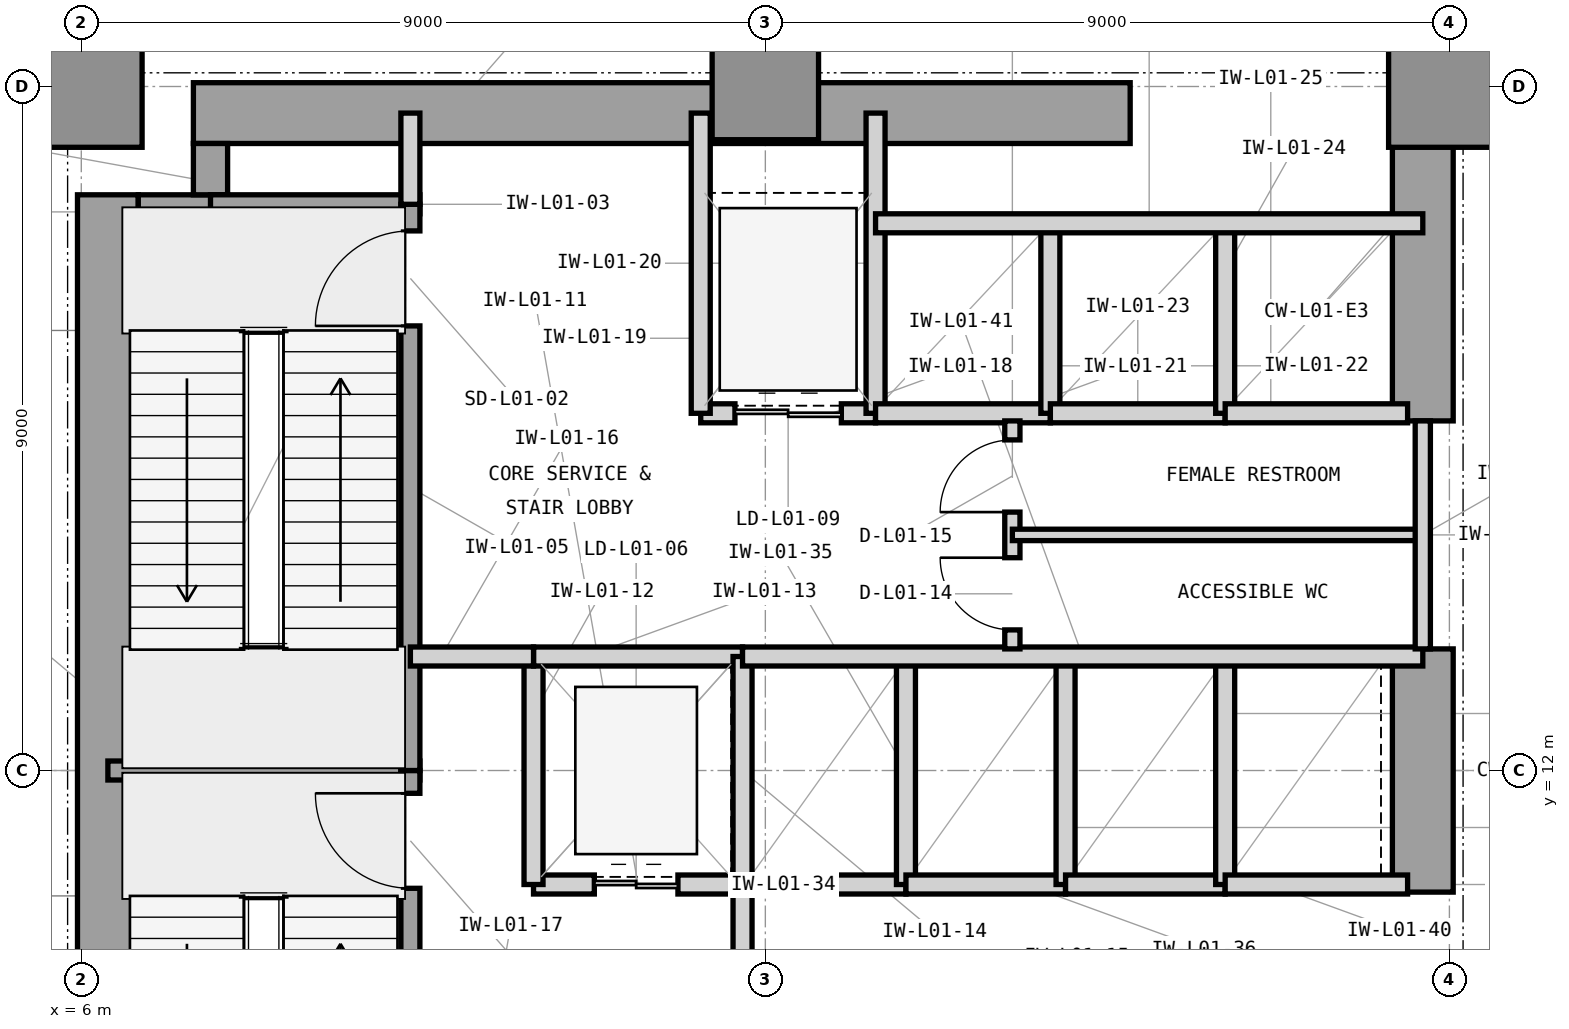
"""IFC4 building model, lengths in metres.
Left out: names, types, materials, properties, quantities, classifications, styles, units other than length and angle.
Written with IfcOpenShell. Run it as: python <this file> out.ifc"""

import sys

from ifc_helpers import new_model, si_unit, direction, frame, frame_2d, origin, origin_2d, place, context, subcontext, project, spatial, rectangle, extrude, element, fill, save


model = new_model("IFC4")
c1 = context("Model", 3, precision=1e-05, world=origin(), true_north=direction((0.0, 1.0)))
c2 = subcontext(c1, "Body", "Model", "MODEL_VIEW")
j1 = project(units=[si_unit("LENGTHUNIT", "METRE"), si_unit("PLANEANGLEUNIT", "RADIAN")], contexts=[c1])
p1 = place(None, origin())
s1 = spatial("IfcSite", under=j1, at=p1, CompositionType="ELEMENT")
p2 = place(p1, origin())
s2 = spatial("IfcBuilding", under=s1, at=p2, CompositionType="ELEMENT")
p3 = place(p2, frame((0.0, 0.0, 5.4)))
s3 = spatial("IfcBuildingStorey", under=s2, at=p3, CompositionType="ELEMENT", Elevation=5.4)
p4 = place(p3, frame((6.35, 4.425, 0.0), z_axis=(0.0, 0.0, 1.0), x_axis=(0.0, 1.0, 0.0)))
e1 = element("IfcWall", 1, at=p4, inside=s3, PredefinedType="SHEAR", context=c2, shape_type="SweptSolid", body=[
    extrude(rectangle(XDim=15.15, YDim=0.8, at=frame_2d((7.575, 0.0))), origin(), (0.0, 0.0, 1.0), 5.4),
])
p5 = place(p3, frame((7.475, 20.65, 0.0), z_axis=(0.0, 0.0, 1.0), x_axis=(1.0, 0.0, 0.0)))
e2 = element("IfcWall", 2, at=p5, inside=s3, PredefinedType="SHEAR", context=c2, shape_type="SweptSolid", body=[
    extrude(rectangle(XDim=12.325, YDim=0.8, at=frame_2d((6.163, 0.0))), origin(), (0.0, 0.0, 1.0), 5.4),
])
p6 = place(p3, frame((23.65, 10.4, 0.0), z_axis=(0.0, 0.0, 1.0), x_axis=(0.0, 1.0, 0.0)))
e3 = element("IfcWall", 3, at=p6, inside=s3, PredefinedType="SHEAR", context=c2, shape_type="SweptSolid", body=[
    extrude(rectangle(XDim=3.2, YDim=0.8, at=frame_2d((1.6, 0.0))), origin(), (0.0, 0.0, 1.0), 5.4),
])
p7 = place(p3, frame((23.65, 16.6, 0.0), z_axis=(0.0, 0.0, 1.0), x_axis=(0.0, 1.0, 0.0)))
e4 = element("IfcWall", 4, at=p7, inside=s3, PredefinedType="SHEAR", context=c2, shape_type="SweptSolid", body=[
    extrude(rectangle(XDim=4.05, YDim=0.8, at=frame_2d((2.025, 0.0))), origin(), (0.0, 0.0, 1.0), 5.4),
])
p8 = place(p3, frame((6.75, 19.35, 0.0), z_axis=(0.0, 0.0, 1.0), x_axis=(1.0, 0.0, 0.0)))
e5 = element("IfcWall", 5, at=p8, inside=s3, PredefinedType="SHEAR", context=c2, shape_type="SweptSolid", body=[
    extrude(rectangle(XDim=1.175, YDim=0.45, at=frame_2d((0.587, 0.0))), origin(), (0.0, 0.0, 1.0), 5.4),
])
p9 = place(p3, frame((7.7, 19.575, 0.0), z_axis=(0.0, 0.0, 1.0), x_axis=(0.0, 1.0, 0.0)))
e6 = element("IfcWall", 6, at=p9, inside=s3, PredefinedType="SHEAR", context=c2, shape_type="SweptSolid", body=[
    extrude(rectangle(XDim=0.675, YDim=0.45, at=frame_2d((0.337, 0.0))), origin(), (0.0, 0.0, 1.0), 5.4),
])
p10 = place(p3, frame((6.0, 21.0, 0.0), z_axis=(0.0, 0.0, 1.0), x_axis=(1.0, 0.0, 0.0)))
e7 = element("IfcColumn", 7, at=p10, inside=s3, PredefinedType="COLUMN", context=c2, shape_type="SweptSolid", body=[
    extrude(rectangle(XDim=1.6, YDim=1.6, at=origin_2d()), origin(), (0.0, 0.0, 1.0), 5.4),
])
p11 = place(p3, frame((15.0, 21.0, 0.0), z_axis=(0.0, 0.0, 1.0), x_axis=(1.0, 0.0, 0.0)))
e8 = element("IfcColumn", 8, at=p11, inside=s3, PredefinedType="COLUMN", context=c2, shape_type="SweptSolid", body=[
    extrude(rectangle(XDim=1.4, YDim=1.4, at=origin_2d()), origin(), (0.0, 0.0, 1.0), 5.4),
])
p12 = place(p3, frame((24.0, 21.0, 0.0), z_axis=(0.0, 0.0, 1.0), x_axis=(1.0, 0.0, 0.0)))
e9 = element("IfcColumn", 9, at=p12, inside=s3, PredefinedType="COLUMN", context=c2, shape_type="SweptSolid", body=[
    extrude(rectangle(XDim=1.6, YDim=1.6, at=origin_2d()), origin(), (0.0, 0.0, 1.0), 5.4),
])
p13 = place(p3, frame((6.35, 12.0, 0.0), z_axis=(0.0, 0.0, 1.0), x_axis=(1.0, 0.0, 0.0)))
e10 = element("IfcWall", 10, at=p13, inside=s3, PredefinedType="SHEAR", context=c2, shape_type="SweptSolid", body=[
    extrude(rectangle(XDim=4.105, YDim=0.25, at=frame_2d((2.052, 0.0))), origin(), (0.0, 0.0, 1.0), 5.4),
])
p14 = place(p3, frame((7.7, 19.45, 0.0), z_axis=(0.0, 0.0, 1.0), x_axis=(1.0, 0.0, 0.0)))
e11 = element("IfcWall", 11, at=p14, inside=s3, PredefinedType="SHEAR", context=c2, shape_type="SweptSolid", body=[
    extrude(rectangle(XDim=2.755, YDim=0.25, at=frame_2d((1.377, 0.0))), origin(), (0.0, 0.0, 1.0), 5.4),
])
p15 = place(p3, frame((10.33, 4.55, 0.0), z_axis=(0.0, 0.0, 1.0), x_axis=(0.0, 1.0, 0.0)))
e12 = element("IfcWall", 12, at=p15, inside=s3, PredefinedType="SHEAR", context=c2, shape_type="SweptSolid", body=[
    extrude(rectangle(XDim=7.45, YDim=0.25, at=frame_2d((3.725, 0.0))), origin(), (0.0, 0.0, 1.0), 5.4),
])
p16 = place(p15, frame((5.9, 0.0, 0.0)))
e13 = element("IfcOpeningElement", 13, at=p16, cuts=e12, PredefinedType="OPENING", context=c2, shape_type="SweptSolid", body=[
    extrude(rectangle(XDim=1.25, YDim=2.2, at=frame_2d((0.625, 1.1))), frame((0.0, 0.135, 0.0), z_axis=(0.0, -1.0, 0.0), x_axis=(1.0, 0.0, 0.0)), (0.0, 0.0, 1.0), 0.27),
])
p17 = place(p3, frame((10.33, 12.0, 0.0), z_axis=(0.0, 0.0, 1.0), x_axis=(0.0, 1.0, 0.0)))
e14 = element("IfcWall", 14, at=p17, inside=s3, PredefinedType="SHEAR", context=c2, shape_type="SweptSolid", body=[
    extrude(rectangle(XDim=7.45, YDim=0.25, at=frame_2d((3.725, 0.0))), origin(), (0.0, 0.0, 1.0), 5.4),
])
p18 = place(p17, frame((5.85, 0.0, 0.0)))
e15 = element("IfcOpeningElement", 15, at=p18, cuts=e14, PredefinedType="OPENING", context=c2, shape_type="SweptSolid", body=[
    extrude(rectangle(XDim=1.25, YDim=2.2, at=frame_2d((0.625, 1.1))), frame((0.0, 0.135, 0.0), z_axis=(0.0, -1.0, 0.0), x_axis=(1.0, 0.0, 0.0)), (0.0, 0.0, 1.0), 0.27),
])
p19 = place(p3, frame((10.33, 19.45, 0.0), z_axis=(0.0, 0.0, 1.0), x_axis=(0.0, 1.0, 0.0)))
e16 = element("IfcWall", 16, at=p19, inside=s3, PredefinedType="PARTITIONING", context=c2, shape_type="SweptSolid", body=[
    extrude(rectangle(XDim=1.2, YDim=0.25, at=frame_2d((0.6, 0.0))), origin(), (0.0, 0.0, 1.0), 4.234),
])
p20 = place(p3, frame((11.95, 10.5, 0.0), z_axis=(0.0, 0.0, 1.0), x_axis=(1.0, 0.0, 0.0)))
e17 = element("IfcWall", 17, at=p20, inside=s3, PredefinedType="PARTITIONING", context=c2, shape_type="SweptSolid", body=[
    extrude(rectangle(XDim=2.75, YDim=0.25, at=frame_2d((1.375, 0.0))), origin(), (0.0, 0.0, 1.0), 4.473),
])
p21 = place(p20, frame((0.8, 0.0, 0.0)))
e18 = element("IfcOpeningElement", 18, at=p21, cuts=e17, PredefinedType="OPENING", context=c2, shape_type="SweptSolid", body=[
    extrude(rectangle(XDim=1.1, YDim=2.25, at=frame_2d((0.55, 1.125))), frame((0.0, 0.135, 0.0), z_axis=(0.0, -1.0, 0.0), x_axis=(1.0, 0.0, 0.0)), (0.0, 0.0, 1.0), 0.27),
])
p22 = place(p3, frame((11.95, 10.5, 0.0), z_axis=(0.0, 0.0, 1.0), x_axis=(0.0, 1.0, 0.0)))
e19 = element("IfcWall", 19, at=p22, inside=s3, PredefinedType="PARTITIONING", context=c2, shape_type="SweptSolid", body=[
    extrude(rectangle(XDim=3.0, YDim=0.25, at=frame_2d((1.5, 0.0))), origin(), (0.0, 0.0, 1.0), 5.09),
])
p23 = place(p3, frame((11.95, 13.5, 0.0), z_axis=(0.0, 0.0, 1.0), x_axis=(1.0, 0.0, 0.0)))
e20 = element("IfcWall", 20, at=p23, inside=s3, PredefinedType="PARTITIONING", context=c2, shape_type="SweptSolid", body=[
    extrude(rectangle(XDim=2.75, YDim=0.25, at=frame_2d((1.375, 0.0))), origin(), (0.0, 0.0, 1.0), 4.473),
])
p24 = place(p3, frame((14.7, 10.5, 0.0), z_axis=(0.0, 0.0, 1.0), x_axis=(0.0, 1.0, 0.0)))
e21 = element("IfcWall", 21, at=p24, inside=s3, PredefinedType="PARTITIONING", context=c2, shape_type="SweptSolid", body=[
    extrude(rectangle(XDim=3.0, YDim=0.25, at=frame_2d((1.5, 0.0))), origin(), (0.0, 0.0, 1.0), 5.09),
])
p25 = place(p3, frame((14.7, 6.7, 0.0), z_axis=(0.0, 0.0, 1.0), x_axis=(0.0, 1.0, 0.0)))
e22 = element("IfcWall", 22, at=p25, inside=s3, PredefinedType="PARTITIONING", context=c2, shape_type="SweptSolid", body=[
    extrude(rectangle(XDim=3.8, YDim=0.25, at=frame_2d((1.9, 0.0))), origin(), (0.0, 0.0, 1.0), 5.09),
])
p26 = place(p25, frame((1.3, 0.0, 0.0)))
e23 = element("IfcOpeningElement", 23, at=p26, cuts=e22, PredefinedType="OPENING", context=c2, shape_type="SweptSolid", body=[
    extrude(rectangle(XDim=1.2, YDim=2.2, at=frame_2d((0.6, 1.1))), frame((0.0, 0.135, 0.0), z_axis=(0.0, -1.0, 0.0), x_axis=(1.0, 0.0, 0.0)), (0.0, 0.0, 1.0), 0.27),
])
p27 = place(p3, frame((10.33, 13.5, 0.0), z_axis=(0.0, 0.0, 1.0), x_axis=(1.0, 0.0, 0.0)))
e24 = element("IfcWall", 24, at=p27, inside=s3, PredefinedType="PARTITIONING", context=c2, shape_type="SweptSolid", body=[
    extrude(rectangle(XDim=1.62, YDim=0.25, at=frame_2d((0.81, 0.0))), origin(), (0.0, 0.0, 1.0), 4.473),
])
p28 = place(p3, frame((14.15, 16.7, 0.0), z_axis=(0.0, 0.0, 1.0), x_axis=(1.0, 0.0, 0.0)))
e25 = element("IfcWall", 25, at=p28, inside=s3, PredefinedType="PARTITIONING", context=c2, shape_type="SweptSolid", body=[
    extrude(rectangle(XDim=2.3, YDim=0.25, at=frame_2d((1.15, 0.0))), origin(), (0.0, 0.0, 1.0), 4.473),
])
p29 = place(p28, frame((0.45, 0.0, 0.0)))
e26 = element("IfcOpeningElement", 26, at=p29, cuts=e25, PredefinedType="OPENING", context=c2, shape_type="SweptSolid", body=[
    extrude(rectangle(XDim=1.4, YDim=2.35, at=frame_2d((0.7, 1.175))), frame((0.0, 0.135, 0.0), z_axis=(0.0, -1.0, 0.0), x_axis=(1.0, 0.0, 0.0)), (0.0, 0.0, 1.0), 0.27),
])
for number, where, z_axis, x_axis in (
    (27, (14.15, 16.7, 0.0), (0.0, 0.0, 1.0), (0.0, 1.0, 0.0)),
    (28, (16.45, 16.7, 0.0), (0.0, 0.0, 1.0), (0.0, 1.0, 0.0)),
):
    element("IfcWall", number, at=place(p3, frame(where, z_axis=z_axis, x_axis=x_axis)), inside=s3, PredefinedType="PARTITIONING", context=c2, shape_type="SweptSolid", body=[
        extrude(rectangle(XDim=3.95, YDim=0.25, at=frame_2d((1.975, 0.0))), origin(), (0.0, 0.0, 1.0), 5.09),
    ])
p30 = place(p3, frame((16.45, 16.7, 0.0), z_axis=(0.0, 0.0, 1.0), x_axis=(1.0, 0.0, 0.0)))
e29 = element("IfcWall", 29, at=p30, inside=s3, PredefinedType="PARTITIONING", context=c2, shape_type="SweptSolid", body=[
    extrude(rectangle(XDim=2.3, YDim=0.25, at=frame_2d((1.15, 0.0))), origin(), (0.0, 0.0, 1.0), 4.473),
])
p31 = place(p3, frame((18.75, 16.7, 0.0), z_axis=(0.0, 0.0, 1.0), x_axis=(0.0, 1.0, 0.0)))
e30 = element("IfcWall", 30, at=p31, inside=s3, PredefinedType="PARTITIONING", context=c2, shape_type="SweptSolid", body=[
    extrude(rectangle(XDim=2.5, YDim=0.25, at=frame_2d((1.25, 0.0))), origin(), (0.0, 0.0, 1.0), 5.09),
])
p32 = place(p3, frame((18.75, 16.7, 0.0), z_axis=(0.0, 0.0, 1.0), x_axis=(1.0, 0.0, 0.0)))
e31 = element("IfcWall", 31, at=p32, inside=s3, PredefinedType="PARTITIONING", context=c2, shape_type="SweptSolid", body=[
    extrude(rectangle(XDim=2.3, YDim=0.25, at=frame_2d((1.15, 0.0))), origin(), (0.0, 0.0, 1.0), 4.473),
])
p33 = place(p3, frame((21.05, 16.7, 0.0), z_axis=(0.0, 0.0, 1.0), x_axis=(0.0, 1.0, 0.0)))
e32 = element("IfcWall", 32, at=p33, inside=s3, PredefinedType="PARTITIONING", context=c2, shape_type="SweptSolid", body=[
    extrude(rectangle(XDim=2.5, YDim=0.25, at=frame_2d((1.25, 0.0))), origin(), (0.0, 0.0, 1.0), 5.09),
])
p34 = place(p3, frame((21.05, 16.7, 0.0), z_axis=(0.0, 0.0, 1.0), x_axis=(1.0, 0.0, 0.0)))
e33 = element("IfcWall", 33, at=p34, inside=s3, PredefinedType="PARTITIONING", context=c2, shape_type="SweptSolid", body=[
    extrude(rectangle(XDim=2.4, YDim=0.25, at=frame_2d((1.2, 0.0))), origin(), (0.0, 0.0, 1.0), 4.473),
])
p35 = place(p3, frame((16.45, 19.2, 0.0), z_axis=(0.0, 0.0, 1.0), x_axis=(1.0, 0.0, 0.0)))
e34 = element("IfcWall", 34, at=p35, inside=s3, PredefinedType="PARTITIONING", context=c2, shape_type="SweptSolid", body=[
    extrude(rectangle(XDim=7.2, YDim=0.25, at=frame_2d((3.6, 0.0))), origin(), (0.0, 0.0, 1.0), 5.09),
])
p36 = place(p3, frame((14.7, 10.5, 0.0), z_axis=(0.0, 0.0, 1.0), x_axis=(1.0, 0.0, 0.0)))
e35 = element("IfcWall", 35, at=p36, inside=s3, PredefinedType="PARTITIONING", context=c2, shape_type="SweptSolid", body=[
    extrude(rectangle(XDim=2.15, YDim=0.25, at=frame_2d((1.075, 0.0))), origin(), (0.0, 0.0, 1.0), 4.473),
])
p37 = place(p3, frame((16.85, 10.5, 0.0), z_axis=(0.0, 0.0, 1.0), x_axis=(0.0, 1.0, 0.0)))
e36 = element("IfcWall", 36, at=p37, inside=s3, PredefinedType="PARTITIONING", context=c2, shape_type="SweptSolid", body=[
    extrude(rectangle(XDim=3.0, YDim=0.25, at=frame_2d((1.5, 0.0))), origin(), (0.0, 0.0, 1.0), 5.09),
])
p38 = place(p3, frame((16.85, 10.5, 0.0), z_axis=(0.0, 0.0, 1.0), x_axis=(1.0, 0.0, 0.0)))
e37 = element("IfcWall", 37, at=p38, inside=s3, PredefinedType="PARTITIONING", context=c2, shape_type="SweptSolid", body=[
    extrude(rectangle(XDim=2.1, YDim=0.25, at=frame_2d((1.05, 0.0))), origin(), (0.0, 0.0, 1.0), 4.473),
])
p39 = place(p3, frame((18.95, 10.5, 0.0), z_axis=(0.0, 0.0, 1.0), x_axis=(0.0, 1.0, 0.0)))
e38 = element("IfcWall", 38, at=p39, inside=s3, PredefinedType="PARTITIONING", context=c2, shape_type="SweptSolid", body=[
    extrude(rectangle(XDim=3.0, YDim=0.25, at=frame_2d((1.5, 0.0))), origin(), (0.0, 0.0, 1.0), 5.09),
])
p40 = place(p3, frame((18.95, 10.5, 0.0), z_axis=(0.0, 0.0, 1.0), x_axis=(1.0, 0.0, 0.0)))
e39 = element("IfcWall", 39, at=p40, inside=s3, PredefinedType="PARTITIONING", context=c2, shape_type="SweptSolid", body=[
    extrude(rectangle(XDim=2.1, YDim=0.25, at=frame_2d((1.05, 0.0))), origin(), (0.0, 0.0, 1.0), 4.473),
])
p41 = place(p3, frame((21.05, 10.5, 0.0), z_axis=(0.0, 0.0, 1.0), x_axis=(0.0, 1.0, 0.0)))
e40 = element("IfcWall", 40, at=p41, inside=s3, PredefinedType="PARTITIONING", context=c2, shape_type="SweptSolid", body=[
    extrude(rectangle(XDim=3.0, YDim=0.25, at=frame_2d((1.5, 0.0))), origin(), (0.0, 0.0, 1.0), 5.09),
])
p42 = place(p3, frame((21.05, 10.5, 0.0), z_axis=(0.0, 0.0, 1.0), x_axis=(1.0, 0.0, 0.0)))
e41 = element("IfcWall", 41, at=p42, inside=s3, PredefinedType="PARTITIONING", context=c2, shape_type="SweptSolid", body=[
    extrude(rectangle(XDim=2.4, YDim=0.25, at=frame_2d((1.2, 0.0))), origin(), (0.0, 0.0, 1.0), 4.473),
])
p43 = place(p3, frame((14.7, 13.5, 0.0), z_axis=(0.0, 0.0, 1.0), x_axis=(1.0, 0.0, 0.0)))
e42 = element("IfcWall", 42, at=p43, inside=s3, PredefinedType="PARTITIONING", context=c2, shape_type="SweptSolid", body=[
    extrude(rectangle(XDim=8.95, YDim=0.25, at=frame_2d((4.475, 0.0))), origin(), (0.0, 0.0, 1.0), 4.473),
])
p44 = place(p3, frame((18.25, 13.6, 0.0), z_axis=(0.0, 0.0, 1.0), x_axis=(0.0, 1.0, 0.0)))
e43 = element("IfcWall", 43, at=p44, inside=s3, PredefinedType="PARTITIONING", context=c2, shape_type="SweptSolid", body=[
    extrude(rectangle(XDim=3.0, YDim=0.2, at=frame_2d((1.5, 0.0))), origin(), (0.0, 0.0, 1.0), 5.09),
])
p45 = place(p44, frame((0.25, 0.0, 0.0)))
e44 = element("IfcOpeningElement", 44, at=p45, cuts=e43, PredefinedType="OPENING", context=c2, shape_type="SweptSolid", body=[
    extrude(rectangle(XDim=0.95, YDim=2.1, at=frame_2d((0.475, 1.05))), frame((0.0, 0.11, 0.0), z_axis=(0.0, -1.0, 0.0), x_axis=(1.0, 0.0, 0.0)), (0.0, 0.0, 1.0), 0.22),
])
p46 = place(p44, frame((1.8, 0.0, 0.0)))
e45 = element("IfcOpeningElement", 45, at=p46, cuts=e43, PredefinedType="OPENING", context=c2, shape_type="SweptSolid", body=[
    extrude(rectangle(XDim=0.95, YDim=2.1, at=frame_2d((0.475, 1.05))), frame((0.0, 0.11, 0.0), z_axis=(0.0, -1.0, 0.0), x_axis=(1.0, 0.0, 0.0)), (0.0, 0.0, 1.0), 0.22),
])
p47 = place(p3, frame((18.25, 15.1, 0.0), z_axis=(0.0, 0.0, 1.0), x_axis=(1.0, 0.0, 0.0)))
e46 = element("IfcWall", 46, at=p47, inside=s3, PredefinedType="PARTITIONING", context=c2, shape_type="SweptSolid", body=[
    extrude(rectangle(XDim=5.4, YDim=0.15, at=frame_2d((2.7, 0.0))), origin(), (0.0, 0.0, 1.0), 5.09),
])
p48 = place(p3, frame((23.65, 13.6, 0.0), z_axis=(0.0, 0.0, 1.0), x_axis=(0.0, 1.0, 0.0)))
e47 = element("IfcWall", 47, at=p48, inside=s3, PredefinedType="PARTITIONING", context=c2, shape_type="SweptSolid", body=[
    extrude(rectangle(XDim=3.0, YDim=0.2, at=frame_2d((1.5, 0.0))), origin(), (0.0, 0.0, 1.0), 5.09),
])
p49 = place(p3, frame((6.25, 20.65, 0.0), z_axis=(0.0, 0.0, 1.0), x_axis=(0.0, 1.0, 0.0)))
e48 = element("IfcWall", 48, at=p49, inside=s3, PredefinedType="PARTITIONING", context=c2, shape_type="SweptSolid", body=[
    extrude(rectangle(XDim=9.35, YDim=0.2, at=frame_2d((4.675, 0.0))), origin(), (0.0, 0.0, 1.0), 5.09),
])
p50 = place(p16, origin())
e49 = element("IfcDoor", 49, at=p50, inside=s3, OperationType="SINGLE_SWING_RIGHT", PredefinedType="DOOR", context=c2, shape_type="SweptSolid", body=[
    extrude(rectangle(XDim=1.25, YDim=2.2, at=frame_2d((0.625, 1.1))), frame((0.0, 0.025, 0.0), z_axis=(0.0, -1.0, 0.0), x_axis=(1.0, 0.0, 0.0)), (0.0, 0.0, 1.0), 0.05),
])
fill(e13, e49)
p51 = place(p18, origin())
e50 = element("IfcDoor", 50, at=p51, inside=s3, OperationType="SINGLE_SWING_LEFT", PredefinedType="DOOR", context=c2, shape_type="SweptSolid", body=[
    extrude(rectangle(XDim=1.25, YDim=2.2, at=frame_2d((0.625, 1.1))), frame((0.0, 0.025, 0.0), z_axis=(0.0, -1.0, 0.0), x_axis=(1.0, 0.0, 0.0)), (0.0, 0.0, 1.0), 0.05),
])
fill(e15, e50)
p52 = place(p21, origin())
e51 = element("IfcDoor", 51, at=p52, inside=s3, OperationType="DOUBLE_DOOR_SLIDING", PredefinedType="DOOR", context=c2, shape_type="SweptSolid", body=[
    extrude(rectangle(XDim=1.1, YDim=2.25, at=frame_2d((0.55, 1.125))), frame((0.0, 0.025, 0.0), z_axis=(0.0, -1.0, 0.0), x_axis=(1.0, 0.0, 0.0)), (0.0, 0.0, 1.0), 0.05),
])
fill(e18, e51)
p53 = place(p29, origin())
e52 = element("IfcDoor", 52, at=p53, inside=s3, OperationType="DOUBLE_DOOR_SLIDING", PredefinedType="DOOR", context=c2, shape_type="SweptSolid", body=[
    extrude(rectangle(XDim=1.4, YDim=2.35, at=frame_2d((0.7, 1.175))), frame((0.0, 0.025, 0.0), z_axis=(0.0, -1.0, 0.0), x_axis=(1.0, 0.0, 0.0)), (0.0, 0.0, 1.0), 0.05),
])
fill(e26, e52)
p54 = place(p45, origin())
e53 = element("IfcDoor", 53, at=p54, inside=s3, OperationType="SINGLE_SWING_RIGHT", PredefinedType="DOOR", context=c2, shape_type="SweptSolid", body=[
    extrude(rectangle(XDim=0.95, YDim=2.1, at=frame_2d((0.475, 1.05))), frame((0.0, 0.025, 0.0), z_axis=(0.0, -1.0, 0.0), x_axis=(1.0, 0.0, 0.0)), (0.0, 0.0, 1.0), 0.05),
])
fill(e44, e53)
p55 = place(p46, origin())
e54 = element("IfcDoor", 54, at=p55, inside=s3, OperationType="SINGLE_SWING_LEFT", PredefinedType="DOOR", context=c2, shape_type="SweptSolid", body=[
    extrude(rectangle(XDim=0.95, YDim=2.1, at=frame_2d((0.475, 1.05))), frame((0.0, 0.025, 0.0), z_axis=(0.0, -1.0, 0.0), x_axis=(1.0, 0.0, 0.0)), (0.0, 0.0, 1.0), 0.05),
])
fill(e45, e54)
save(model, sys.argv[1])
